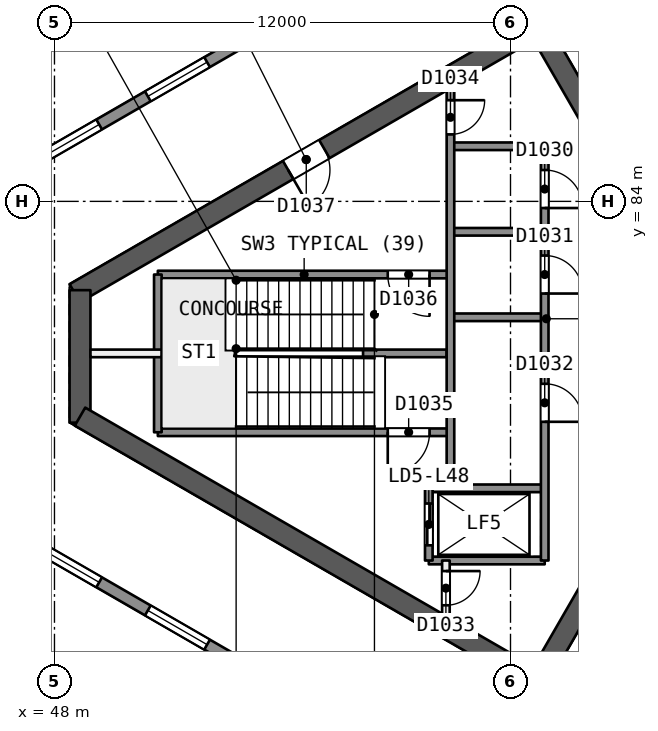
"""IFC4 building model, lengths in metres.
Left out: names, types, materials, properties, quantities, classifications, styles, units other than length and angle.
Written with IfcOpenShell. Run it as: python <this file> out.ifc"""

import sys

from ifc_helpers import new_model, si_unit, direction, frame, frame_2d, origin, place, context, subcontext, project, spatial, rectangle, extrude, element, fill, save


model = new_model("IFC4")
c1 = context("Model", 3, precision=1e-05, world=origin(), true_north=direction((0.0, 1.0)))
c2 = subcontext(c1, "Body", "Model", "MODEL_VIEW")
j1 = project(units=[si_unit("LENGTHUNIT", "METRE"), si_unit("PLANEANGLEUNIT", "RADIAN")], contexts=[c1])
p1 = place(None, origin())
s1 = spatial("IfcSite", under=j1, at=p1, CompositionType="ELEMENT")
p2 = place(p1, origin())
s2 = spatial("IfcBuilding", under=s1, at=p2, CompositionType="ELEMENT")
p3 = place(p2, frame((0.0, 0.0, 197.0)))
s3 = spatial("IfcBuildingStorey", under=s2, at=p3, CompositionType="ELEMENT", Elevation=197.0)
p4 = place(p3, frame((65.682, 80.0, 0.0), z_axis=(0.0, 0.0, 1.0), x_axis=(-0.500000202252, 0.866025287014, 0.0)))
e1 = element("IfcWall", 1, at=p4, inside=s3, PredefinedType="SHEAR", context=c2, shape_type="SweptSolid", body=[
    extrude(rectangle(XDim=10.221, YDim=0.55, at=frame_2d((5.111, 0.0))), origin(), (0.0, 0.0, 1.0), 4.4),
])
p5 = place(p4, frame((0.791, 0.0, 0.0)))
e2 = element("IfcOpeningElement", 2, at=p5, cuts=e1, PredefinedType="OPENING", context=c2, shape_type="SweptSolid", body=[
    extrude(rectangle(XDim=1.2, YDim=2.1, at=frame_2d((0.6, 1.05))), frame((0.0, 0.286, 0.0), z_axis=(0.0, -1.0, 0.0), x_axis=(1.0, 0.0, 0.0)), (0.0, 0.0, 1.0), 0.571),
])
p6 = place(p3, frame((60.709, 88.614, 0.0), z_axis=(0.0, 0.0, 1.0), x_axis=(-0.866020164116, -0.500009075263, 0.0)))
e3 = element("IfcWall", 3, at=p6, inside=s3, PredefinedType="SHEAR", context=c2, shape_type="SweptSolid", body=[
    extrude(rectangle(XDim=14.058, YDim=0.55, at=frame_2d((7.029, 0.0))), origin(), (0.0, 0.0, 1.0), 4.4),
])
p7 = place(p6, frame((6.475, 0.0, 0.0)))
e4 = element("IfcOpeningElement", 4, at=p7, cuts=e3, PredefinedType="OPENING", context=c2, shape_type="SweptSolid", body=[
    extrude(rectangle(XDim=1.1, YDim=2.1, at=frame_2d((0.55, 1.05))), frame((0.0, 0.286, 0.0), z_axis=(0.0, -1.0, 0.0), x_axis=(1.0, 0.0, 0.0)), (0.0, 0.0, 1.0), 0.571),
])
p8 = place(p3, frame((48.672, 81.664, 0.0), z_axis=(0.0, 0.0, 1.0), x_axis=(0.0, -1.0, 0.0)))
e5 = element("IfcWall", 5, at=p8, inside=s3, PredefinedType="SHEAR", context=c2, shape_type="SweptSolid", body=[
    extrude(rectangle(XDim=3.487, YDim=0.55, at=frame_2d((1.743, 0.0))), origin(), (0.0, 0.0, 1.0), 4.4),
])
p9 = place(p3, frame((48.672, 78.336, 0.0), z_axis=(0.0, 0.0, 1.0), x_axis=(0.866023530946, -0.500003243837, 0.0)))
e6 = element("IfcWall", 6, at=p9, inside=s3, PredefinedType="SHEAR", context=c2, shape_type="SweptSolid", body=[
    extrude(rectangle(XDim=14.175, YDim=0.55, at=frame_2d((7.087, 0.0))), origin(), (0.0, 0.0, 1.0), 4.4),
])
p10 = place(p3, frame((60.709, 71.386, 0.0), z_axis=(0.0, 0.0, 1.0), x_axis=(0.500015938302, 0.866016201606, 0.0)))
e7 = element("IfcWall", 7, at=p10, inside=s3, PredefinedType="SHEAR", context=c2, shape_type="SweptSolid", body=[
    extrude(rectangle(XDim=10.105, YDim=0.55, at=frame_2d((5.053, 0.0))), origin(), (0.0, 0.0, 1.0), 4.4),
])
p11 = place(p10, frame((7.955, 0.0, 0.0)))
e8 = element("IfcOpeningElement", 8, at=p11, cuts=e7, PredefinedType="OPENING", context=c2, shape_type="SweptSolid", body=[
    extrude(rectangle(XDim=1.2, YDim=2.1, at=frame_2d((0.6, 1.05))), frame((0.0, 0.286, 0.0), z_axis=(0.0, -1.0, 0.0), x_axis=(1.0, 0.0, 0.0)), (0.0, 0.0, 1.0), 0.571),
])
p12 = place(p3, frame((43.362, 82.667, 0.0), z_axis=(0.0, 0.0, 1.0), x_axis=(0.866025243948, 0.500000276845, 0.0)))
e9 = element("IfcWall", 9, at=p12, inside=s3, PredefinedType="SOLIDWALL", context=c2, shape_type="SweptSolid", body=[
    extrude(rectangle(XDim=52.132, YDim=0.3, at=frame_2d((26.066, 0.0))), origin(), (0.0, 0.0, 1.0), 3.95),
])
p13 = place(p12, frame((8.193, 0.0, 0.9)))
e10 = element("IfcOpeningElement", 10, at=p13, cuts=e9, PredefinedType="OPENING", context=c2, shape_type="SweptSolid", body=[
    extrude(rectangle(XDim=1.8, YDim=1.5, at=frame_2d((0.9, 0.75))), frame((0.0, 0.161, 0.0), z_axis=(0.0, -1.0, 0.0), x_axis=(1.0, 0.0, 0.0)), (0.0, 0.0, 1.0), 0.321),
])
p14 = place(p12, frame((42.139, 0.0, 0.9)))
e11 = element("IfcOpeningElement", 11, at=p14, cuts=e9, PredefinedType="OPENING", context=c2, shape_type="SweptSolid", body=[
    extrude(rectangle(XDim=1.8, YDim=1.5, at=frame_2d((0.9, 0.75))), frame((0.0, 0.161, 0.0), z_axis=(0.0, -1.0, 0.0), x_axis=(1.0, 0.0, 0.0)), (0.0, 0.0, 1.0), 0.321),
])
p15 = place(p12, frame((3.713, 0.0, 0.6)))
e12 = element("IfcOpeningElement", 12, at=p15, cuts=e9, PredefinedType="OPENING", context=c2, shape_type="SweptSolid", body=[
    extrude(rectangle(XDim=3.0, YDim=2.4, at=frame_2d((1.5, 1.2))), frame((0.0, 0.161, 0.0), z_axis=(0.0, -1.0, 0.0), x_axis=(1.0, 0.0, 0.0)), (0.0, 0.0, 1.0), 0.321),
])
p16 = place(p12, frame((14.14, 0.0, 0.6)))
e13 = element("IfcOpeningElement", 13, at=p16, cuts=e9, PredefinedType="OPENING", context=c2, shape_type="SweptSolid", body=[
    extrude(rectangle(XDim=3.0, YDim=2.4, at=frame_2d((1.5, 1.2))), frame((0.0, 0.161, 0.0), z_axis=(0.0, -1.0, 0.0), x_axis=(1.0, 0.0, 0.0)), (0.0, 0.0, 1.0), 0.321),
])
p17 = place(p12, frame((24.566, 0.0, 0.6)))
e14 = element("IfcOpeningElement", 14, at=p17, cuts=e9, PredefinedType="OPENING", context=c2, shape_type="SweptSolid", body=[
    extrude(rectangle(XDim=3.0, YDim=2.4, at=frame_2d((1.5, 1.2))), frame((0.0, 0.161, 0.0), z_axis=(0.0, -1.0, 0.0), x_axis=(1.0, 0.0, 0.0)), (0.0, 0.0, 1.0), 0.321),
])
p18 = place(p12, frame((34.992, 0.0, 0.6)))
e15 = element("IfcOpeningElement", 15, at=p18, cuts=e9, PredefinedType="OPENING", context=c2, shape_type="SweptSolid", body=[
    extrude(rectangle(XDim=3.0, YDim=2.4, at=frame_2d((1.5, 1.2))), frame((0.0, 0.161, 0.0), z_axis=(0.0, -1.0, 0.0), x_axis=(1.0, 0.0, 0.0)), (0.0, 0.0, 1.0), 0.321),
])
p19 = place(p12, frame((45.419, 0.0, 0.6)))
e16 = element("IfcOpeningElement", 16, at=p19, cuts=e9, PredefinedType="OPENING", context=c2, shape_type="SweptSolid", body=[
    extrude(rectangle(XDim=3.0, YDim=2.4, at=frame_2d((1.5, 1.2))), frame((0.0, 0.161, 0.0), z_axis=(0.0, -1.0, 0.0), x_axis=(1.0, 0.0, 0.0)), (0.0, 0.0, 1.0), 0.321),
])
p20 = place(p3, frame((88.51, 51.267, 0.0), z_axis=(0.0, 0.0, 1.0), x_axis=(-0.866025243948, 0.500000276845, 0.0)))
e17 = element("IfcWall", 17, at=p20, inside=s3, PredefinedType="SOLIDWALL", context=c2, shape_type="SweptSolid", body=[
    extrude(rectangle(XDim=52.132, YDim=0.3, at=frame_2d((26.066, 0.0))), origin(), (0.0, 0.0, 1.0), 3.95),
])
p21 = place(p20, frame((42.139, 0.0, 0.9)))
e18 = element("IfcOpeningElement", 18, at=p21, cuts=e17, PredefinedType="OPENING", context=c2, shape_type="SweptSolid", body=[
    extrude(rectangle(XDim=1.8, YDim=1.5, at=frame_2d((0.9, 0.75))), frame((0.0, 0.161, 0.0), z_axis=(0.0, -1.0, 0.0), x_axis=(1.0, 0.0, 0.0)), (0.0, 0.0, 1.0), 0.321),
])
p22 = place(p20, frame((8.193, 0.0, 0.9)))
e19 = element("IfcOpeningElement", 19, at=p22, cuts=e17, PredefinedType="OPENING", context=c2, shape_type="SweptSolid", body=[
    extrude(rectangle(XDim=1.8, YDim=1.5, at=frame_2d((0.9, 0.75))), frame((0.0, 0.161, 0.0), z_axis=(0.0, -1.0, 0.0), x_axis=(1.0, 0.0, 0.0)), (0.0, 0.0, 1.0), 0.321),
])
p23 = place(p20, frame((3.713, 0.0, 0.6)))
e20 = element("IfcOpeningElement", 20, at=p23, cuts=e17, PredefinedType="OPENING", context=c2, shape_type="SweptSolid", body=[
    extrude(rectangle(XDim=3.0, YDim=2.4, at=frame_2d((1.5, 1.2))), frame((0.0, 0.161, 0.0), z_axis=(0.0, -1.0, 0.0), x_axis=(1.0, 0.0, 0.0)), (0.0, 0.0, 1.0), 0.321),
])
p24 = place(p20, frame((14.14, 0.0, 0.6)))
e21 = element("IfcOpeningElement", 21, at=p24, cuts=e17, PredefinedType="OPENING", context=c2, shape_type="SweptSolid", body=[
    extrude(rectangle(XDim=3.0, YDim=2.4, at=frame_2d((1.5, 1.2))), frame((0.0, 0.161, 0.0), z_axis=(0.0, -1.0, 0.0), x_axis=(1.0, 0.0, 0.0)), (0.0, 0.0, 1.0), 0.321),
])
p25 = place(p20, frame((24.566, 0.0, 0.6)))
e22 = element("IfcOpeningElement", 22, at=p25, cuts=e17, PredefinedType="OPENING", context=c2, shape_type="SweptSolid", body=[
    extrude(rectangle(XDim=3.0, YDim=2.4, at=frame_2d((1.5, 1.2))), frame((0.0, 0.161, 0.0), z_axis=(0.0, -1.0, 0.0), x_axis=(1.0, 0.0, 0.0)), (0.0, 0.0, 1.0), 0.321),
])
p26 = place(p20, frame((34.992, 0.0, 0.6)))
e23 = element("IfcOpeningElement", 23, at=p26, cuts=e17, PredefinedType="OPENING", context=c2, shape_type="SweptSolid", body=[
    extrude(rectangle(XDim=3.0, YDim=2.4, at=frame_2d((1.5, 1.2))), frame((0.0, 0.161, 0.0), z_axis=(0.0, -1.0, 0.0), x_axis=(1.0, 0.0, 0.0)), (0.0, 0.0, 1.0), 0.321),
])
p27 = place(p20, frame((45.419, 0.0, 0.6)))
e24 = element("IfcOpeningElement", 24, at=p27, cuts=e17, PredefinedType="OPENING", context=c2, shape_type="SweptSolid", body=[
    extrude(rectangle(XDim=3.0, YDim=2.4, at=frame_2d((1.5, 1.2))), frame((0.0, 0.161, 0.0), z_axis=(0.0, -1.0, 0.0), x_axis=(1.0, 0.0, 0.0)), (0.0, 0.0, 1.0), 0.321),
])
for number, where, z_axis, x_axis in (
    (25, (60.9, 85.45, 0.0), (0.0, 0.0, 1.0), (-1.0, 0.0, 0.0)),
    (26, (60.9, 83.2, 0.0), (0.0, 0.0, 1.0), (-1.0, 0.0, 0.0)),
):
    element("IfcWall", number, at=place(p3, frame(where, z_axis=z_axis, x_axis=x_axis)), inside=s3, PredefinedType="SOLIDWALL", context=c2, shape_type="SweptSolid", body=[
        extrude(rectangle(XDim=2.48, YDim=0.2, at=frame_2d((1.24, 0.0))), origin(), (0.0, 0.0, 1.0), 3.95),
    ])
p28 = place(p3, frame((58.42, 82.075, 0.0), z_axis=(0.0, 0.0, 1.0), x_axis=(-1.0, 0.0, 0.0)))
e27 = element("IfcWall", 27, at=p28, inside=s3, PredefinedType="SOLIDWALL", context=c2, shape_type="SweptSolid", body=[
    extrude(rectangle(XDim=7.7, YDim=0.2, at=frame_2d((3.85, 0.0))), origin(), (0.0, 0.0, 1.0), 3.95),
])
p29 = place(p28, frame((0.55, 0.0, 0.0)))
e28 = element("IfcOpeningElement", 28, at=p29, cuts=e27, PredefinedType="OPENING", context=c2, shape_type="SweptSolid", body=[
    extrude(rectangle(XDim=1.1, YDim=2.1, at=frame_2d((0.55, 1.05))), frame((0.0, 0.11, 0.0), z_axis=(0.0, -1.0, 0.0), x_axis=(1.0, 0.0, 0.0)), (0.0, 0.0, 1.0), 0.221),
])
p30 = place(p3, frame((60.9, 80.95, 0.0), z_axis=(0.0, 0.0, 1.0), x_axis=(-1.0, 0.0, 0.0)))
e29 = element("IfcWall", 29, at=p30, inside=s3, PredefinedType="SOLIDWALL", context=c2, shape_type="SweptSolid", body=[
    extrude(rectangle(XDim=2.48, YDim=0.2, at=frame_2d((1.24, 0.0))), origin(), (0.0, 0.0, 1.0), 3.95),
])
p31 = place(p3, frame((58.32, 80.0, 0.0), z_axis=(0.0, 0.0, 1.0), x_axis=(-1.0, 0.0, 0.0)))
e30 = element("IfcWall", 30, at=p31, inside=s3, PredefinedType="SOLIDWALL", context=c2, shape_type="SweptSolid", body=[
    extrude(rectangle(XDim=2.2, YDim=0.2, at=frame_2d((1.1, 0.0))), origin(), (0.0, 0.0, 1.0), 3.95),
])
p32 = place(p3, frame((50.82, 80.0, 0.0), z_axis=(0.0, 0.0, 1.0), x_axis=(-1.0, 0.0, 0.0)))
e31 = element("IfcWall", 31, at=p32, inside=s3, PredefinedType="PARTITIONING", context=c2, shape_type="SweptSolid", body=[
    extrude(rectangle(XDim=1.873, YDim=0.2, at=frame_2d((0.937, 0.0))), origin(), (0.0, 0.0, 1.0), 3.95),
])
p33 = place(p3, frame((58.42, 77.925, 0.0), z_axis=(0.0, 0.0, 1.0), x_axis=(-1.0, 0.0, 0.0)))
e32 = element("IfcWall", 32, at=p33, inside=s3, PredefinedType="SOLIDWALL", context=c2, shape_type="SweptSolid", body=[
    extrude(rectangle(XDim=7.7, YDim=0.2, at=frame_2d((3.85, 0.0))), origin(), (0.0, 0.0, 1.0), 3.95),
])
p34 = place(p33, frame((0.55, 0.0, 0.0)))
e33 = element("IfcOpeningElement", 33, at=p34, cuts=e32, PredefinedType="OPENING", context=c2, shape_type="SweptSolid", body=[
    extrude(rectangle(XDim=1.1, YDim=2.1, at=frame_2d((0.55, 1.05))), frame((0.0, 0.11, 0.0), z_axis=(0.0, -1.0, 0.0), x_axis=(1.0, 0.0, 0.0)), (0.0, 0.0, 1.0), 0.221),
])
for number, where, z_axis, x_axis in (
    (34, (60.9, 76.45, 0.0), (0.0, 0.0, 1.0), (-1.0, 0.0, 0.0)),
    (35, (60.9, 74.55, 0.0), (0.0, 0.0, 1.0), (-1.0, 0.0, 0.0)),
):
    element("IfcWall", number, at=place(p3, frame(where, z_axis=z_axis, x_axis=x_axis)), inside=s3, PredefinedType="SOLIDWALL", context=c2, shape_type="SweptSolid", body=[
        extrude(rectangle(XDim=3.05, YDim=0.2, at=frame_2d((1.525, 0.0))), origin(), (0.0, 0.0, 1.0), 3.95),
    ])
p35 = place(p3, frame((60.9, 85.45, 0.0), z_axis=(0.0, 0.0, 1.0), x_axis=(0.0, -1.0, 0.0)))
e36 = element("IfcWall", 36, at=p35, inside=s3, PredefinedType="SOLIDWALL", context=c2, shape_type="SweptSolid", body=[
    extrude(rectangle(XDim=10.9, YDim=0.2, at=frame_2d((5.45, 0.0))), origin(), (0.0, 0.0, 1.0), 3.95),
])
p36 = place(p35, frame((0.625, 0.0, 0.0)))
e37 = element("IfcOpeningElement", 37, at=p36, cuts=e36, PredefinedType="OPENING", context=c2, shape_type="SweptSolid", body=[
    extrude(rectangle(XDim=1.0, YDim=2.1, at=frame_2d((0.5, 1.05))), frame((0.0, 0.11, 0.0), z_axis=(0.0, -1.0, 0.0), x_axis=(1.0, 0.0, 0.0)), (0.0, 0.0, 1.0), 0.221),
])
p37 = place(p35, frame((2.875, 0.0, 0.0)))
e38 = element("IfcOpeningElement", 38, at=p37, cuts=e36, PredefinedType="OPENING", context=c2, shape_type="SweptSolid", body=[
    extrude(rectangle(XDim=1.0, YDim=2.1, at=frame_2d((0.5, 1.05))), frame((0.0, 0.11, 0.0), z_axis=(0.0, -1.0, 0.0), x_axis=(1.0, 0.0, 0.0)), (0.0, 0.0, 1.0), 0.221),
])
p38 = place(p35, frame((6.25, 0.0, 0.0)))
e39 = element("IfcOpeningElement", 39, at=p38, cuts=e36, PredefinedType="OPENING", context=c2, shape_type="SweptSolid", body=[
    extrude(rectangle(XDim=1.0, YDim=2.1, at=frame_2d((0.5, 1.05))), frame((0.0, 0.11, 0.0), z_axis=(0.0, -1.0, 0.0), x_axis=(1.0, 0.0, 0.0)), (0.0, 0.0, 1.0), 0.221),
])
p39 = place(p3, frame((58.42, 86.974, 0.0), z_axis=(0.0, 0.0, 1.0), x_axis=(0.0, -1.0, 0.0)))
e40 = element("IfcWall", 40, at=p39, inside=s3, PredefinedType="SOLIDWALL", context=c2, shape_type="SweptSolid", body=[
    extrude(rectangle(XDim=10.524, YDim=0.2, at=frame_2d((5.262, 0.0))), origin(), (0.0, 0.0, 1.0), 3.95),
])
p40 = place(p39, frame((0.312, 0.0, 0.0)))
e41 = element("IfcOpeningElement", 41, at=p40, cuts=e40, PredefinedType="OPENING", context=c2, shape_type="SweptSolid", body=[
    extrude(rectangle(XDim=0.9, YDim=2.1, at=frame_2d((0.45, 1.05))), frame((0.0, 0.11, 0.0), z_axis=(0.0, -1.0, 0.0), x_axis=(1.0, 0.0, 0.0)), (0.0, 0.0, 1.0), 0.221),
])
p41 = place(p3, frame((58.3, 74.55, 0.0), z_axis=(0.0, 0.0, 1.0), x_axis=(0.0, -1.0, 0.0)))
e42 = element("IfcWall", 42, at=p41, inside=s3, PredefinedType="PARTITIONING", context=c2, shape_type="SweptSolid", body=[
    extrude(rectangle(XDim=1.455, YDim=0.2, at=frame_2d((0.728, 0.0))), origin(), (0.0, 0.0, 1.0), 3.95),
])
p42 = place(p41, frame((0.278, 0.0, 0.0)))
e43 = element("IfcOpeningElement", 43, at=p42, cuts=e42, PredefinedType="OPENING", context=c2, shape_type="SweptSolid", body=[
    extrude(rectangle(XDim=0.9, YDim=2.1, at=frame_2d((0.45, 1.05))), frame((0.0, 0.11, 0.0), z_axis=(0.0, -1.0, 0.0), x_axis=(1.0, 0.0, 0.0)), (0.0, 0.0, 1.0), 0.221),
])
p43 = place(p3, frame((57.85, 76.45, 0.0), z_axis=(0.0, 0.0, 1.0), x_axis=(0.0, -1.0, 0.0)))
e44 = element("IfcWall", 44, at=p43, inside=s3, PredefinedType="SOLIDWALL", context=c2, shape_type="SweptSolid", body=[
    extrude(rectangle(XDim=1.9, YDim=0.2, at=frame_2d((0.95, 0.0))), origin(), (0.0, 0.0, 1.0), 3.95),
])
p44 = place(p43, frame((0.4, 0.0, 0.0)))
e45 = element("IfcOpeningElement", 45, at=p44, cuts=e44, PredefinedType="OPENING", context=c2, shape_type="SweptSolid", body=[
    extrude(rectangle(XDim=1.1, YDim=2.1, at=frame_2d((0.55, 1.05))), frame((0.0, 0.11, 0.0), z_axis=(0.0, -1.0, 0.0), x_axis=(1.0, 0.0, 0.0)), (0.0, 0.0, 1.0), 0.221),
])
p45 = place(p3, frame((50.72, 82.075, 0.0), z_axis=(0.0, 0.0, 1.0), x_axis=(0.0, -1.0, 0.0)))
e46 = element("IfcWall", 46, at=p45, inside=s3, PredefinedType="SOLIDWALL", context=c2, shape_type="SweptSolid", body=[
    extrude(rectangle(XDim=4.15, YDim=0.2, at=frame_2d((2.075, 0.0))), origin(), (0.0, 0.0, 1.0), 3.95),
])
p46 = place(p13, origin())
e47 = element("IfcWindow", 47, at=p46, inside=s3, PartitioningType="SINGLE_PANEL", PredefinedType="WINDOW", context=c2, shape_type="SweptSolid", body=[
    extrude(rectangle(XDim=1.8, YDim=1.5, at=frame_2d((0.9, 0.75))), frame((0.0, 0.03, 0.0), z_axis=(0.0, -1.0, 0.0), x_axis=(1.0, 0.0, 0.0)), (0.0, 0.0, 1.0), 0.06),
])
fill(e10, e47)
p47 = place(p21, origin())
e48 = element("IfcWindow", 48, at=p47, inside=s3, PartitioningType="SINGLE_PANEL", PredefinedType="WINDOW", context=c2, shape_type="SweptSolid", body=[
    extrude(rectangle(XDim=1.8, YDim=1.5, at=frame_2d((0.9, 0.75))), frame((0.0, 0.03, 0.0), z_axis=(0.0, -1.0, 0.0), x_axis=(1.0, 0.0, 0.0)), (0.0, 0.0, 1.0), 0.06),
])
fill(e18, e48)
p48 = place(p15, origin())
e49 = element("IfcWindow", 49, at=p48, inside=s3, PartitioningType="SINGLE_PANEL", PredefinedType="WINDOW", context=c2, shape_type="SweptSolid", body=[
    extrude(rectangle(XDim=3.0, YDim=2.4, at=frame_2d((1.5, 1.2))), frame((0.0, 0.03, 0.0), z_axis=(0.0, -1.0, 0.0), x_axis=(1.0, 0.0, 0.0)), (0.0, 0.0, 1.0), 0.06),
])
fill(e12, e49)
p49 = place(p27, origin())
e50 = element("IfcWindow", 50, at=p49, inside=s3, PartitioningType="SINGLE_PANEL", PredefinedType="WINDOW", context=c2, shape_type="SweptSolid", body=[
    extrude(rectangle(XDim=3.0, YDim=2.4, at=frame_2d((1.5, 1.2))), frame((0.0, 0.03, 0.0), z_axis=(0.0, -1.0, 0.0), x_axis=(1.0, 0.0, 0.0)), (0.0, 0.0, 1.0), 0.06),
])
fill(e24, e50)
p50 = place(p44, origin())
e51 = element("IfcDoor", 51, at=p50, inside=s3, OperationType="SLIDING_TO_RIGHT", PredefinedType="NOTDEFINED", context=c2, shape_type="SweptSolid", body=[
    extrude(rectangle(XDim=1.1, YDim=2.1, at=frame_2d((0.55, 1.05))), frame((0.0, 0.025, 0.0), z_axis=(0.0, -1.0, 0.0), x_axis=(1.0, 0.0, 0.0)), (0.0, 0.0, 1.0), 0.05),
])
fill(e45, e51)
p51 = place(p36, origin())
e52 = element("IfcDoor", 52, at=p51, inside=s3, OperationType="SINGLE_SWING_RIGHT", PredefinedType="NOTDEFINED", context=c2, shape_type="SweptSolid", body=[
    extrude(rectangle(XDim=1.0, YDim=2.1, at=frame_2d((0.5, 1.05))), frame((0.0, 0.025, 0.0), z_axis=(0.0, -1.0, 0.0), x_axis=(1.0, 0.0, 0.0)), (0.0, 0.0, 1.0), 0.05),
])
fill(e37, e52)
p52 = place(p37, origin())
e53 = element("IfcDoor", 53, at=p52, inside=s3, OperationType="SINGLE_SWING_RIGHT", PredefinedType="NOTDEFINED", context=c2, shape_type="SweptSolid", body=[
    extrude(rectangle(XDim=1.0, YDim=2.1, at=frame_2d((0.5, 1.05))), frame((0.0, 0.025, 0.0), z_axis=(0.0, -1.0, 0.0), x_axis=(1.0, 0.0, 0.0)), (0.0, 0.0, 1.0), 0.05),
])
fill(e38, e53)
p53 = place(p38, origin())
e54 = element("IfcDoor", 54, at=p53, inside=s3, OperationType="SINGLE_SWING_RIGHT", PredefinedType="NOTDEFINED", context=c2, shape_type="SweptSolid", body=[
    extrude(rectangle(XDim=1.0, YDim=2.1, at=frame_2d((0.5, 1.05))), frame((0.0, 0.025, 0.0), z_axis=(0.0, -1.0, 0.0), x_axis=(1.0, 0.0, 0.0)), (0.0, 0.0, 1.0), 0.05),
])
fill(e39, e54)
p54 = place(p42, origin())
e55 = element("IfcDoor", 55, at=p54, inside=s3, OperationType="SINGLE_SWING_LEFT", PredefinedType="NOTDEFINED", context=c2, shape_type="SweptSolid", body=[
    extrude(rectangle(XDim=0.9, YDim=2.1, at=frame_2d((0.45, 1.05))), frame((0.0, 0.025, 0.0), z_axis=(0.0, -1.0, 0.0), x_axis=(1.0, 0.0, 0.0)), (0.0, 0.0, 1.0), 0.05),
])
fill(e43, e55)
p55 = place(p40, origin())
e56 = element("IfcDoor", 56, at=p55, inside=s3, OperationType="SINGLE_SWING_LEFT", PredefinedType="NOTDEFINED", context=c2, shape_type="SweptSolid", body=[
    extrude(rectangle(XDim=0.9, YDim=2.1, at=frame_2d((0.45, 1.05))), frame((0.0, 0.025, 0.0), z_axis=(0.0, -1.0, 0.0), x_axis=(1.0, 0.0, 0.0)), (0.0, 0.0, 1.0), 0.05),
])
fill(e41, e56)
p56 = place(p34, origin())
e57 = element("IfcDoor", 57, at=p56, inside=s3, OperationType="SINGLE_SWING_RIGHT", PredefinedType="NOTDEFINED", context=c2, shape_type="SweptSolid", body=[
    extrude(rectangle(XDim=1.1, YDim=2.1, at=frame_2d((0.55, 1.05))), frame((0.0, 0.025, 0.0), z_axis=(0.0, -1.0, 0.0), x_axis=(1.0, 0.0, 0.0)), (0.0, 0.0, 1.0), 0.05),
])
fill(e33, e57)
p57 = place(p29, origin())
e58 = element("IfcDoor", 58, at=p57, inside=s3, OperationType="SINGLE_SWING_LEFT", PredefinedType="NOTDEFINED", context=c2, shape_type="SweptSolid", body=[
    extrude(rectangle(XDim=1.1, YDim=2.1, at=frame_2d((0.55, 1.05))), frame((0.0, 0.025, 0.0), z_axis=(0.0, -1.0, 0.0), x_axis=(1.0, 0.0, 0.0)), (0.0, 0.0, 1.0), 0.05),
])
fill(e28, e58)
p58 = place(p7, origin())
e59 = element("IfcDoor", 59, at=p58, inside=s3, OperationType="SINGLE_SWING_RIGHT", PredefinedType="NOTDEFINED", context=c2, shape_type="SweptSolid", body=[
    extrude(rectangle(XDim=1.1, YDim=2.1, at=frame_2d((0.55, 1.05))), frame((0.0, 0.025, 0.0), z_axis=(0.0, -1.0, 0.0), x_axis=(1.0, 0.0, 0.0)), (0.0, 0.0, 1.0), 0.05),
])
fill(e4, e59)
save(model, sys.argv[1])
